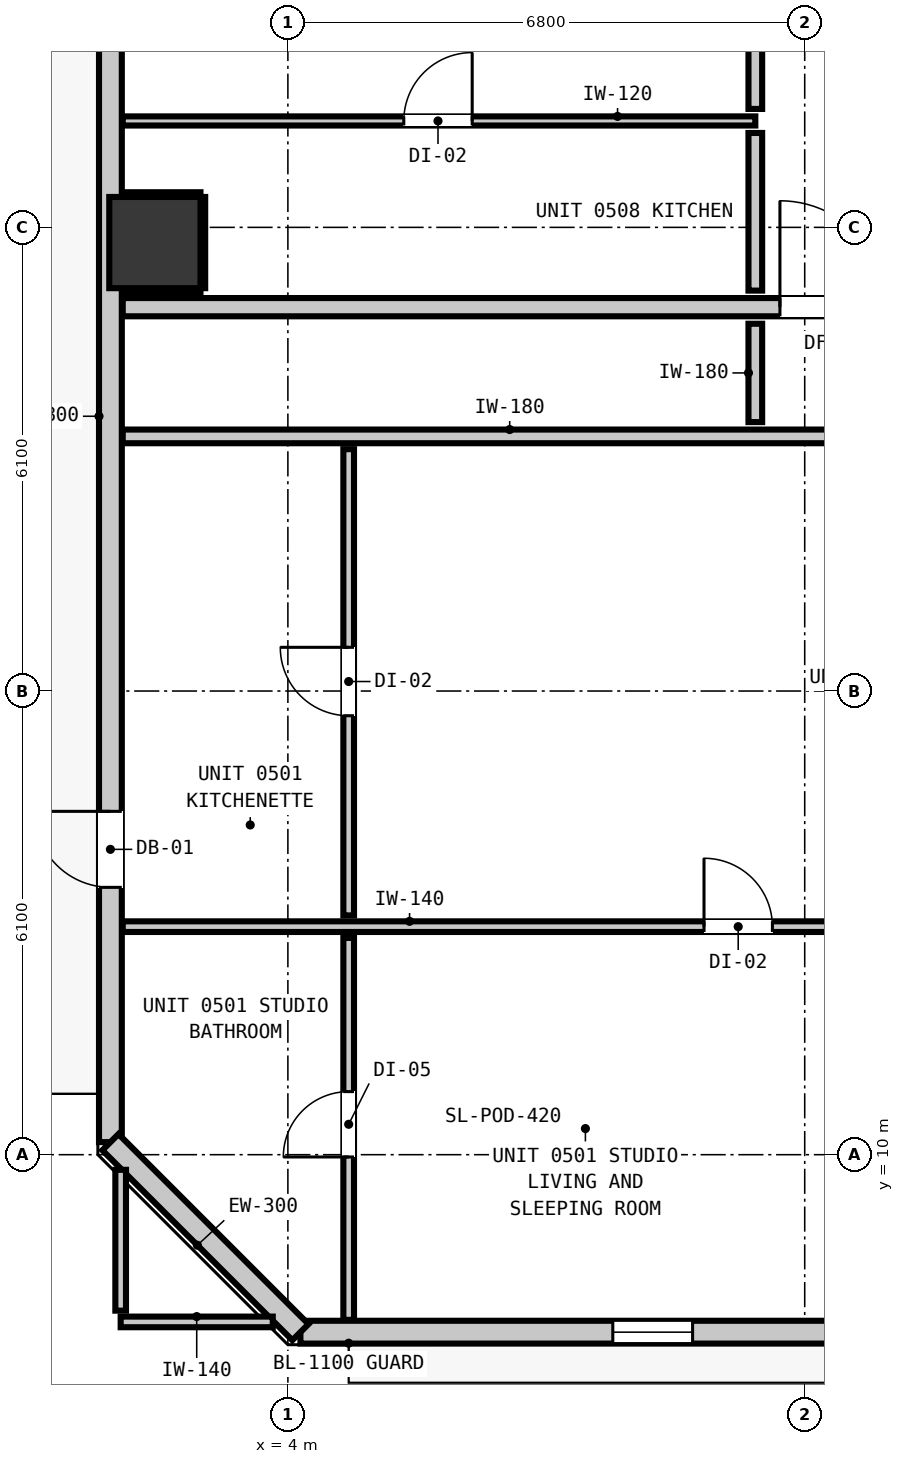
"""IFC4 building model, lengths in metres.
Left out: names, types, materials, properties, quantities, classifications, styles, units other than length and angle.
Written with IfcOpenShell. Run it as: python <this file> out.ifc"""

import sys

from ifc_helpers import new_model, si_unit, direction, frame, frame_2d, origin, origin_2d, place, context, subcontext, project, spatial, rectangle, extrude, element, fill, save


model = new_model("IFC4")
c1 = context("Model", 3, precision=1e-05, world=origin(), true_north=direction((0.0, 1.0)))
c2 = subcontext(c1, "Body", "Model", "MODEL_VIEW")
j1 = project(units=[si_unit("LENGTHUNIT", "METRE"), si_unit("PLANEANGLEUNIT", "RADIAN")], contexts=[c1])
p1 = place(None, origin())
s1 = spatial("IfcSite", under=j1, at=p1, CompositionType="ELEMENT")
p2 = place(p1, origin())
s2 = spatial("IfcBuilding", under=s1, at=p2, CompositionType="ELEMENT")
p3 = place(p2, frame((0.0, 0.0, 22.0)))
s3 = spatial("IfcBuildingStorey", under=s2, at=p3, CompositionType="ELEMENT", Elevation=22.0)
p4 = place(p3, frame((2.25, 22.0, -0.2), z_axis=(0.0, 0.0, 1.0), x_axis=(1.0, 0.0, 0.0)))
e1 = element("IfcColumn", 1, at=p4, inside=s3, PredefinedType="COLUMN", context=c2, shape_type="SweptSolid", body=[
    extrude(rectangle(XDim=1.2, YDim=1.2, at=origin_2d()), origin(), (0.0, 0.0, 1.0), 3.52),
])
p5 = place(p3, frame((1.665, 10.165, 0.0), z_axis=(0.0, 0.0, 1.0), x_axis=(0.0, 1.0, 0.0)))
e2 = element("IfcWall", 2, at=p5, inside=s3, PredefinedType="STANDARD", context=c2, shape_type="SweptSolid", body=[
    extrude(rectangle(XDim=34.67, YDim=0.3, at=frame_2d((17.335, 0.0))), origin(), (0.0, 0.0, 1.0), 3.06),
])
p6 = place(p5, frame((3.352, 0.0, 0.0)))
e3 = element("IfcOpeningElement", 3, at=p6, cuts=e2, PredefinedType="OPENING", context=c2, shape_type="SweptSolid", body=[
    extrude(rectangle(XDim=1.0, YDim=2.15, at=frame_2d((0.5, 1.075))), frame((0.0, 0.16, 0.0), z_axis=(0.0, -1.0, 0.0), x_axis=(1.0, 0.0, 0.0)), (0.0, 0.0, 1.0), 0.32),
])
p7 = place(p5, frame((14.748, 0.0, 0.85)))
e4 = element("IfcOpeningElement", 4, at=p7, cuts=e2, PredefinedType="OPENING", context=c2, shape_type="SweptSolid", body=[
    extrude(rectangle(XDim=1.05, YDim=1.65, at=frame_2d((0.525, 0.825))), frame((0.0, 0.16, 0.0), z_axis=(0.0, -1.0, 0.0), x_axis=(1.0, 0.0, 0.0)), (0.0, 0.0, 1.0), 0.32),
])
p8 = place(p5, frame((17.898, 0.0, 0.85)))
e5 = element("IfcOpeningElement", 5, at=p8, cuts=e2, PredefinedType="OPENING", context=c2, shape_type="SweptSolid", body=[
    extrude(rectangle(XDim=1.05, YDim=1.65, at=frame_2d((0.525, 0.825))), frame((0.0, 0.16, 0.0), z_axis=(0.0, -1.0, 0.0), x_axis=(1.0, 0.0, 0.0)), (0.0, 0.0, 1.0), 0.32),
])
p9 = place(p5, frame((24.282, 0.0, 0.85)))
e6 = element("IfcOpeningElement", 6, at=p9, cuts=e2, PredefinedType="OPENING", context=c2, shape_type="SweptSolid", body=[
    extrude(rectangle(XDim=1.05, YDim=1.65, at=frame_2d((0.525, 0.825))), frame((0.0, 0.16, 0.0), z_axis=(0.0, -1.0, 0.0), x_axis=(1.0, 0.0, 0.0)), (0.0, 0.0, 1.0), 0.32),
])
p10 = place(p5, frame((27.333, 0.0, 0.85)))
e7 = element("IfcOpeningElement", 7, at=p10, cuts=e2, PredefinedType="OPENING", context=c2, shape_type="SweptSolid", body=[
    extrude(rectangle(XDim=1.05, YDim=1.65, at=frame_2d((0.525, 0.825))), frame((0.0, 0.16, 0.0), z_axis=(0.0, -1.0, 0.0), x_axis=(1.0, 0.0, 0.0)), (0.0, 0.0, 1.0), 0.32),
])
p11 = place(p3, frame((41.635, 7.665, 0.0), z_axis=(0.0, 0.0, 1.0), x_axis=(-1.0, 0.0, 0.0)))
e8 = element("IfcWall", 8, at=p11, inside=s3, PredefinedType="STANDARD", context=c2, shape_type="SweptSolid", body=[
    extrude(rectangle(XDim=37.47, YDim=0.3, at=frame_2d((18.735, 0.0))), origin(), (0.0, 0.0, 1.0), 3.06),
])
p12 = place(p11, frame((1.251, 0.0, 0.0)))
e9 = element("IfcOpeningElement", 9, at=p12, cuts=e8, PredefinedType="OPENING", context=c2, shape_type="SweptSolid", body=[
    extrude(rectangle(XDim=1.0, YDim=2.15, at=frame_2d((0.5, 1.075))), frame((0.0, 0.16, 0.0), z_axis=(0.0, -1.0, 0.0), x_axis=(1.0, 0.0, 0.0)), (0.0, 0.0, 1.0), 0.32),
])
p13 = place(p11, frame((32.31, 0.0, 0.85)))
e10 = element("IfcOpeningElement", 10, at=p13, cuts=e8, PredefinedType="OPENING", context=c2, shape_type="SweptSolid", body=[
    extrude(rectangle(XDim=1.05, YDim=1.65, at=frame_2d((0.525, 0.825))), frame((0.0, 0.16, 0.0), z_axis=(0.0, -1.0, 0.0), x_axis=(1.0, 0.0, 0.0)), (0.0, 0.0, 1.0), 0.32),
])
p14 = place(p11, frame((22.091, 0.0, 0.85)))
e11 = element("IfcOpeningElement", 11, at=p14, cuts=e8, PredefinedType="OPENING", context=c2, shape_type="SweptSolid", body=[
    extrude(rectangle(XDim=1.05, YDim=1.65, at=frame_2d((0.525, 0.825))), frame((0.0, 0.16, 0.0), z_axis=(0.0, -1.0, 0.0), x_axis=(1.0, 0.0, 0.0)), (0.0, 0.0, 1.0), 0.32),
])
p15 = place(p11, frame((24.666, 0.0, 0.85)))
e12 = element("IfcOpeningElement", 12, at=p15, cuts=e8, PredefinedType="OPENING", context=c2, shape_type="SweptSolid", body=[
    extrude(rectangle(XDim=1.05, YDim=1.65, at=frame_2d((0.525, 0.825))), frame((0.0, 0.16, 0.0), z_axis=(0.0, -1.0, 0.0), x_axis=(1.0, 0.0, 0.0)), (0.0, 0.0, 1.0), 0.32),
])
p16 = place(p11, frame((13.434, 0.0, 0.85)))
e13 = element("IfcOpeningElement", 13, at=p16, cuts=e8, PredefinedType="OPENING", context=c2, shape_type="SweptSolid", body=[
    extrude(rectangle(XDim=1.05, YDim=1.65, at=frame_2d((0.525, 0.825))), frame((0.0, 0.16, 0.0), z_axis=(0.0, -1.0, 0.0), x_axis=(1.0, 0.0, 0.0)), (0.0, 0.0, 1.0), 0.32),
])
p17 = place(p11, frame((15.863, 0.0, 0.85)))
e14 = element("IfcOpeningElement", 14, at=p17, cuts=e8, PredefinedType="OPENING", context=c2, shape_type="SweptSolid", body=[
    extrude(rectangle(XDim=1.05, YDim=1.65, at=frame_2d((0.525, 0.825))), frame((0.0, 0.16, 0.0), z_axis=(0.0, -1.0, 0.0), x_axis=(1.0, 0.0, 0.0)), (0.0, 0.0, 1.0), 0.32),
])
p18 = place(p11, frame((6.434, 0.0, 0.85)))
e15 = element("IfcOpeningElement", 15, at=p18, cuts=e8, PredefinedType="OPENING", context=c2, shape_type="SweptSolid", body=[
    extrude(rectangle(XDim=1.05, YDim=1.65, at=frame_2d((0.525, 0.825))), frame((0.0, 0.16, 0.0), z_axis=(0.0, -1.0, 0.0), x_axis=(1.0, 0.0, 0.0)), (0.0, 0.0, 1.0), 0.32),
])
p19 = place(p3, frame((4.165, 7.665, 0.0), z_axis=(0.0, 0.0, 1.0), x_axis=(-0.707106781187, 0.707106781187, 0.0)))
e16 = element("IfcWall", 16, at=p19, inside=s3, PredefinedType="STANDARD", context=c2, shape_type="SweptSolid", body=[
    extrude(rectangle(XDim=3.536, YDim=0.3, at=frame_2d((1.768, 0.0))), origin(), (0.0, 0.0, 1.0), 3.06),
])
p20 = place(p3, frame((1.827, 21.15, 0.0), z_axis=(0.0, 0.0, 1.0), x_axis=(1.0, 0.0, 0.0)))
e17 = element("IfcWall", 17, at=p20, inside=s3, PredefinedType="PARTITIONING", context=c2, shape_type="SweptSolid", body=[
    extrude(rectangle(XDim=42.146, YDim=0.24, at=frame_2d((21.073, 0.0))), origin(), (0.0, 0.0, 1.0), 3.06),
])
p21 = place(p20, frame((16.383, 0.0, 0.0)))
e18 = element("IfcOpeningElement", 18, at=p21, cuts=e17, PredefinedType="OPENING", context=c2, shape_type="SweptSolid", body=[
    extrude(rectangle(XDim=1.1, YDim=2.15, at=frame_2d((0.55, 1.075))), frame((0.0, 0.13, 0.0), z_axis=(0.0, -1.0, 0.0), x_axis=(1.0, 0.0, 0.0)), (0.0, 0.0, 1.0), 0.26),
])
p22 = place(p20, frame((8.647, 0.0, 0.0)))
e19 = element("IfcOpeningElement", 19, at=p22, cuts=e17, PredefinedType="OPENING", context=c2, shape_type="SweptSolid", body=[
    extrude(rectangle(XDim=1.4, YDim=2.15, at=frame_2d((0.7, 1.075))), frame((0.0, 0.13, 0.0), z_axis=(0.0, -1.0, 0.0), x_axis=(1.0, 0.0, 0.0)), (0.0, 0.0, 1.0), 0.26),
])
p23 = place(p20, frame((38.524, 0.0, 0.0)))
e20 = element("IfcOpeningElement", 20, at=p23, cuts=e17, PredefinedType="OPENING", context=c2, shape_type="SweptSolid", body=[
    extrude(rectangle(XDim=1.0, YDim=2.15, at=frame_2d((0.5, 1.075))), frame((0.0, 0.13, 0.0), z_axis=(0.0, -1.0, 0.0), x_axis=(1.0, 0.0, 0.0)), (0.0, 0.0, 1.0), 0.26),
])
p24 = place(p3, frame((1.827, 19.45, 0.0), z_axis=(0.0, 0.0, 1.0), x_axis=(1.0, 0.0, 0.0)))
e21 = element("IfcWall", 21, at=p24, inside=s3, PredefinedType="PARTITIONING", context=c2, shape_type="SweptSolid", body=[
    extrude(rectangle(XDim=42.146, YDim=0.18, at=frame_2d((21.073, 0.0))), origin(), (0.0, 0.0, 1.0), 3.06),
])
p25 = place(p24, frame((10.283, 0.0, 0.0)))
e22 = element("IfcOpeningElement", 22, at=p25, cuts=e21, PredefinedType="OPENING", context=c2, shape_type="SweptSolid", body=[
    extrude(rectangle(XDim=1.0, YDim=2.15, at=frame_2d((0.5, 1.075))), frame((0.0, 0.1, 0.0), z_axis=(0.0, -1.0, 0.0), x_axis=(1.0, 0.0, 0.0)), (0.0, 0.0, 1.0), 0.2),
])
p26 = place(p24, frame((17.402, 0.0, 0.0)))
e23 = element("IfcOpeningElement", 23, at=p26, cuts=e21, PredefinedType="OPENING", context=c2, shape_type="SweptSolid", body=[
    extrude(rectangle(XDim=1.0, YDim=2.15, at=frame_2d((0.5, 1.075))), frame((0.0, 0.1, 0.0), z_axis=(0.0, -1.0, 0.0), x_axis=(1.0, 0.0, 0.0)), (0.0, 0.0, 1.0), 0.2),
])
p27 = place(p24, frame((25.904, 0.0, 0.0)))
e24 = element("IfcOpeningElement", 24, at=p27, cuts=e21, PredefinedType="OPENING", context=c2, shape_type="SweptSolid", body=[
    extrude(rectangle(XDim=1.0, YDim=2.15, at=frame_2d((0.5, 1.075))), frame((0.0, 0.1, 0.0), z_axis=(0.0, -1.0, 0.0), x_axis=(1.0, 0.0, 0.0)), (0.0, 0.0, 1.0), 0.2),
])
p28 = place(p24, frame((34.899, 0.0, 0.0)))
e25 = element("IfcOpeningElement", 25, at=p28, cuts=e21, PredefinedType="OPENING", context=c2, shape_type="SweptSolid", body=[
    extrude(rectangle(XDim=1.0, YDim=2.15, at=frame_2d((0.5, 1.075))), frame((0.0, 0.1, 0.0), z_axis=(0.0, -1.0, 0.0), x_axis=(1.0, 0.0, 0.0)), (0.0, 0.0, 1.0), 0.2),
])
p29 = place(p3, frame((1.8, 7.8, 0.0), z_axis=(0.0, 0.0, 1.0), x_axis=(1.0, 0.0, 0.0)))
e26 = element("IfcWall", 26, at=p29, inside=s3, PredefinedType="PARTITIONING", context=c2, shape_type="SweptSolid", body=[
    extrude(rectangle(XDim=2.001, YDim=0.14, at=frame_2d((1.0, 0.0))), origin(), (0.0, 0.0, 1.0), 3.06),
])
p30 = place(p3, frame((1.827, 13.0, 0.0), z_axis=(0.0, 0.0, 1.0), x_axis=(1.0, 0.0, 0.0)))
e27 = element("IfcWall", 27, at=p30, inside=s3, PredefinedType="PARTITIONING", context=c2, shape_type="SweptSolid", body=[
    extrude(rectangle(XDim=16.011, YDim=0.14, at=frame_2d((8.005, 0.0))), origin(), (0.0, 0.0, 1.0), 3.06),
])
p31 = place(p30, frame((7.648, 0.0, 0.0)))
e28 = element("IfcOpeningElement", 28, at=p31, cuts=e27, PredefinedType="OPENING", context=c2, shape_type="SweptSolid", body=[
    extrude(rectangle(XDim=0.9, YDim=2.1, at=frame_2d((0.45, 1.05))), frame((0.0, 0.08, 0.0), z_axis=(0.0, -1.0, 0.0), x_axis=(1.0, 0.0, 0.0)), (0.0, 0.0, 1.0), 0.16),
])
p32 = place(p3, frame((1.827, 23.6, 0.0), z_axis=(0.0, 0.0, 1.0), x_axis=(1.0, 0.0, 0.0)))
e29 = element("IfcWall", 29, at=p32, inside=s3, PredefinedType="PARTITIONING", context=c2, shape_type="SweptSolid", body=[
    extrude(rectangle(XDim=8.323, YDim=0.12, at=frame_2d((4.162, 0.0))), origin(), (0.0, 0.0, 1.0), 3.06),
])
p33 = place(p32, frame((3.698, 0.0, 0.0)))
e30 = element("IfcOpeningElement", 30, at=p33, cuts=e29, PredefinedType="OPENING", context=c2, shape_type="SweptSolid", body=[
    extrude(rectangle(XDim=0.9, YDim=2.1, at=frame_2d((0.45, 1.05))), frame((0.0, 0.07, 0.0), z_axis=(0.0, -1.0, 0.0), x_axis=(1.0, 0.0, 0.0)), (0.0, 0.0, 1.0), 0.14),
])
p34 = place(p3, frame((10.15, 19.638, 0.0), z_axis=(0.0, 0.0, 1.0), x_axis=(0.0, 1.0, 0.0)))
e31 = element("IfcWall", 31, at=p34, inside=s3, PredefinedType="PARTITIONING", context=c2, shape_type="SweptSolid", body=[
    extrude(rectangle(XDim=1.294, YDim=0.18, at=frame_2d((0.647, 0.0))), origin(), (0.0, 0.0, 1.0), 3.06),
])
p35 = place(p3, frame((10.15, 21.368, 0.0), z_axis=(0.0, 0.0, 1.0), x_axis=(0.0, 1.0, 0.0)))
e32 = element("IfcWall", 32, at=p35, inside=s3, PredefinedType="PARTITIONING", context=c2, shape_type="SweptSolid", body=[
    extrude(rectangle(XDim=2.074, YDim=0.18, at=frame_2d((1.037, 0.0))), origin(), (0.0, 0.0, 1.0), 3.06),
])
p36 = place(p3, frame((10.15, 23.758, 0.0), z_axis=(0.0, 0.0, 1.0), x_axis=(0.0, 1.0, 0.0)))
e33 = element("IfcWall", 33, at=p36, inside=s3, PredefinedType="PARTITIONING", context=c2, shape_type="SweptSolid", body=[
    extrude(rectangle(XDim=3.349, YDim=0.18, at=frame_2d((1.674, 0.0))), origin(), (0.0, 0.0, 1.0), 3.06),
])
p37 = place(p36, frame((1.18, 0.0, 0.0)))
e34 = element("IfcOpeningElement", 34, at=p37, cuts=e33, PredefinedType="OPENING", context=c2, shape_type="SweptSolid", body=[
    extrude(rectangle(XDim=1.0, YDim=2.15, at=frame_2d((0.5, 1.075))), frame((0.0, 0.1, 0.0), z_axis=(0.0, -1.0, 0.0), x_axis=(1.0, 0.0, 0.0)), (0.0, 0.0, 1.0), 0.2),
])
p38 = place(p3, frame((1.8, 7.948, 0.0), z_axis=(0.0, 0.0, 1.0), x_axis=(0.0, 1.0, 0.0)))
e35 = element("IfcWall", 35, at=p38, inside=s3, PredefinedType="PARTITIONING", context=c2, shape_type="SweptSolid", body=[
    extrude(rectangle(XDim=1.853, YDim=0.14, at=frame_2d((0.927, 0.0))), origin(), (0.0, 0.0, 1.0), 3.06),
])
p39 = place(p3, frame((4.8, 7.827, 0.0), z_axis=(0.0, 0.0, 1.0), x_axis=(0.0, 1.0, 0.0)))
e36 = element("IfcWall", 36, at=p39, inside=s3, PredefinedType="PARTITIONING", context=c2, shape_type="SweptSolid", body=[
    extrude(rectangle(XDim=5.025, YDim=0.14, at=frame_2d((2.513, 0.0))), origin(), (0.0, 0.0, 1.0), 3.06),
])
p40 = place(p39, frame((2.143, 0.0, 0.0)))
e37 = element("IfcOpeningElement", 37, at=p40, cuts=e36, PredefinedType="OPENING", context=c2, shape_type="SweptSolid", body=[
    extrude(rectangle(XDim=0.86, YDim=2.02, at=frame_2d((0.43, 1.01))), frame((0.0, 0.08, 0.0), z_axis=(0.0, -1.0, 0.0), x_axis=(1.0, 0.0, 0.0)), (0.0, 0.0, 1.0), 0.16),
])
p41 = place(p3, frame((4.8, 13.148, 0.0), z_axis=(0.0, 0.0, 1.0), x_axis=(0.0, 1.0, 0.0)))
e38 = element("IfcWall", 38, at=p41, inside=s3, PredefinedType="PARTITIONING", context=c2, shape_type="SweptSolid", body=[
    extrude(rectangle(XDim=6.134, YDim=0.14, at=frame_2d((3.067, 0.0))), origin(), (0.0, 0.0, 1.0), 3.06),
])
p42 = place(p41, frame((2.627, 0.0, 0.0)))
e39 = element("IfcOpeningElement", 39, at=p42, cuts=e38, PredefinedType="OPENING", context=c2, shape_type="SweptSolid", body=[
    extrude(rectangle(XDim=0.9, YDim=2.1, at=frame_2d((0.45, 1.05))), frame((0.0, 0.08, 0.0), z_axis=(0.0, -1.0, 0.0), x_axis=(1.0, 0.0, 0.0)), (0.0, 0.0, 1.0), 0.16),
])
for number, where, z_axis, x_axis in (
    (40, (1.83, 21.368, 0.0), (0.0, 0.0, 1.0), (1.0, 0.0, 0.0)),
    (41, (1.83, 22.632, 0.0), (0.0, 0.0, 1.0), (1.0, 0.0, 0.0)),
):
    element("IfcWall", number, at=place(p3, frame(where, z_axis=z_axis, x_axis=x_axis)), inside=s3, PredefinedType="PARTITIONING", context=c2, shape_type="SweptSolid", body=[
        extrude(rectangle(XDim=1.02, YDim=0.06, at=frame_2d((0.51, 0.0))), origin(), (0.0, 0.0, 1.0), 1.45),
    ])
p43 = place(p3, frame((2.882, 21.4, 0.0), z_axis=(0.0, 0.0, 1.0), x_axis=(0.0, 1.0, 0.0)))
e42 = element("IfcWall", 42, at=p43, inside=s3, PredefinedType="PARTITIONING", context=c2, shape_type="SweptSolid", body=[
    extrude(rectangle(XDim=1.2, YDim=0.06, at=frame_2d((0.6, 0.0))), origin(), (0.0, 0.0, 1.0), 1.45),
])
p44 = place(p6, origin())
e43 = element("IfcDoor", 43, at=p44, inside=s3, OperationType="SINGLE_SWING_RIGHT", PredefinedType="DOOR", context=c2, shape_type="SweptSolid", body=[
    extrude(rectangle(XDim=1.0, YDim=2.15, at=frame_2d((0.5, 1.075))), frame((0.0, 0.025, 0.0), z_axis=(0.0, -1.0, 0.0), x_axis=(1.0, 0.0, 0.0)), (0.0, 0.0, 1.0), 0.05),
])
fill(e3, e43)
p45 = place(p13, origin())
e44 = element("IfcWindow", 44, at=p45, inside=s3, PartitioningType="SINGLE_PANEL", PredefinedType="WINDOW", context=c2, shape_type="SweptSolid", body=[
    extrude(rectangle(XDim=1.05, YDim=1.65, at=frame_2d((0.525, 0.825))), frame((0.0, 0.03, 0.0), z_axis=(0.0, -1.0, 0.0), x_axis=(1.0, 0.0, 0.0)), (0.0, 0.0, 1.0), 0.06),
])
fill(e10, e44)
p46 = place(p22, origin())
e45 = element("IfcDoor", 45, at=p46, inside=s3, OperationType="SINGLE_SWING_LEFT", PredefinedType="DOOR", context=c2, shape_type="SweptSolid", body=[
    extrude(rectangle(XDim=1.4, YDim=2.15, at=frame_2d((0.7, 1.075))), frame((0.0, 0.025, 0.0), z_axis=(0.0, -1.0, 0.0), x_axis=(1.0, 0.0, 0.0)), (0.0, 0.0, 1.0), 0.05),
])
fill(e19, e45)
p47 = place(p31, origin())
e46 = element("IfcDoor", 46, at=p47, inside=s3, OperationType="SINGLE_SWING_LEFT", PredefinedType="DOOR", context=c2, shape_type="SweptSolid", body=[
    extrude(rectangle(XDim=0.9, YDim=2.1, at=frame_2d((0.45, 1.05))), frame((0.0, 0.025, 0.0), z_axis=(0.0, -1.0, 0.0), x_axis=(1.0, 0.0, 0.0)), (0.0, 0.0, 1.0), 0.05),
])
fill(e28, e46)
p48 = place(p42, origin())
e47 = element("IfcDoor", 47, at=p48, inside=s3, OperationType="SINGLE_SWING_RIGHT", PredefinedType="DOOR", context=c2, shape_type="SweptSolid", body=[
    extrude(rectangle(XDim=0.9, YDim=2.1, at=frame_2d((0.45, 1.05))), frame((0.0, 0.025, 0.0), z_axis=(0.0, -1.0, 0.0), x_axis=(1.0, 0.0, 0.0)), (0.0, 0.0, 1.0), 0.05),
])
fill(e39, e47)
p49 = place(p40, origin())
e48 = element("IfcDoor", 48, at=p49, inside=s3, OperationType="SINGLE_SWING_LEFT", PredefinedType="DOOR", context=c2, shape_type="SweptSolid", body=[
    extrude(rectangle(XDim=0.86, YDim=2.02, at=frame_2d((0.43, 1.01))), frame((0.0, 0.025, 0.0), z_axis=(0.0, -1.0, 0.0), x_axis=(1.0, 0.0, 0.0)), (0.0, 0.0, 1.0), 0.05),
])
fill(e37, e48)
p50 = place(p33, origin())
e49 = element("IfcDoor", 49, at=p50, inside=s3, OperationType="SINGLE_SWING_RIGHT", PredefinedType="DOOR", context=c2, shape_type="SweptSolid", body=[
    extrude(rectangle(XDim=0.9, YDim=2.1, at=frame_2d((0.45, 1.05))), frame((0.0, 0.025, 0.0), z_axis=(0.0, -1.0, 0.0), x_axis=(1.0, 0.0, 0.0)), (0.0, 0.0, 1.0), 0.05),
])
fill(e30, e49)
save(model, sys.argv[1])
